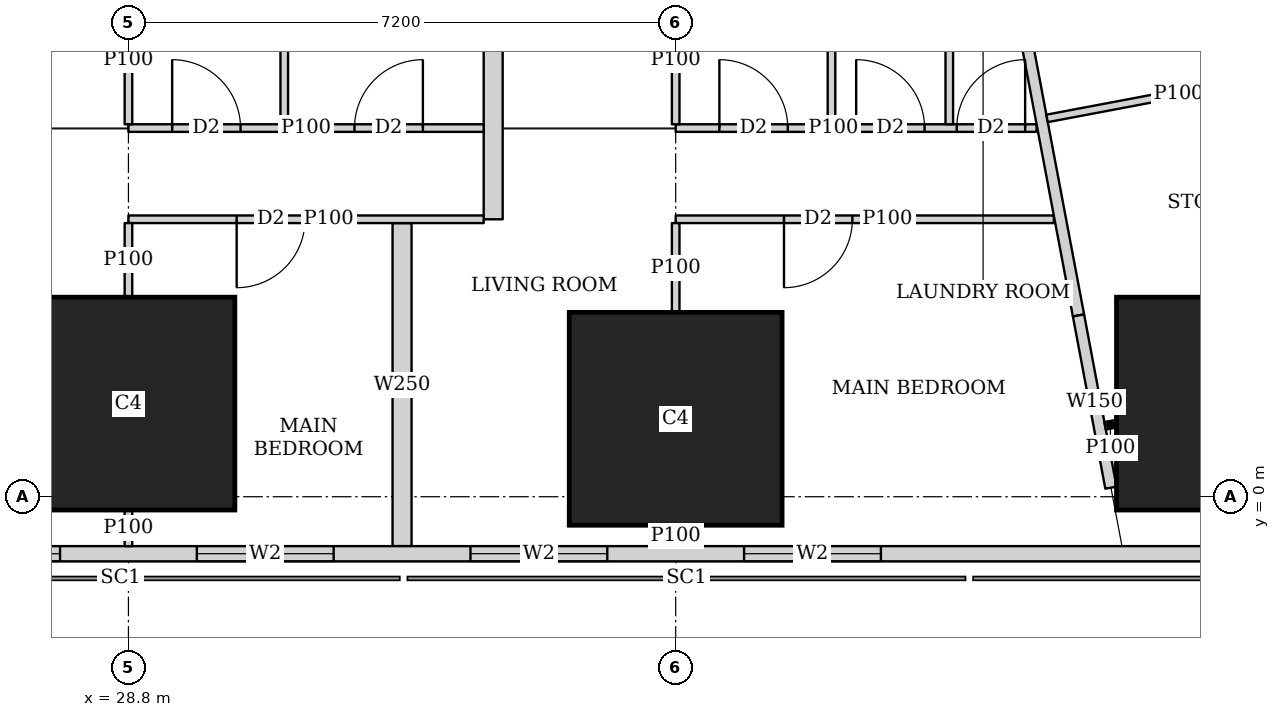
"""IFC4 building model, lengths in metres.
Left out: names, types, materials, properties, quantities, classifications, styles, units other than length and angle.
Written with IfcOpenShell. Run it as: python <this file> out.ifc"""

import sys

from ifc_helpers import new_model, si_unit, direction, frame, frame_2d, origin, origin_2d, place, context, subcontext, project, spatial, rectangle, extrude, element, fill, save


model = new_model("IFC4")
c1 = context("Model", 3, precision=1e-05, world=origin(), true_north=direction((0.0, 1.0)))
c2 = subcontext(c1, "Body", "Model", "MODEL_VIEW")
j1 = project(units=[si_unit("LENGTHUNIT", "METRE"), si_unit("PLANEANGLEUNIT", "RADIAN")], contexts=[c1])
p1 = place(None, origin())
s1 = spatial("IfcSite", under=j1, at=p1, CompositionType="ELEMENT")
p2 = place(p1, origin())
s2 = spatial("IfcBuilding", under=s1, at=p2, CompositionType="ELEMENT")
p3 = place(p2, frame((0.0, 0.0, 68.75)))
s3 = spatial("IfcBuildingStorey", under=s2, at=p3, CompositionType="ELEMENT", Elevation=68.75)
for number, where, z_axis, x_axis in (
    (1, (28.8, 1.225, 0.0), (0.0, 0.0, 1.0), (1.0, 0.0, 0.0)),
    (2, (36.0, 1.025, 0.0), (0.0, 0.0, 1.0), (1.0, 0.0, 0.0)),
    (3, (43.2, 1.225, 0.0), (0.0, 0.0, 1.0), (1.0, 0.0, 0.0)),
):
    element("IfcColumn", number, at=place(p3, frame(where, z_axis=z_axis, x_axis=x_axis)), inside=s3, PredefinedType="COLUMN", context=c2, shape_type="SweptSolid", body=[
        extrude(rectangle(XDim=2.8, YDim=2.8, at=origin_2d()), origin(), (0.0, 0.0, 1.0), 3.75),
    ])
p4 = place(p3, frame((2.163, -0.75, 0.0), z_axis=(0.0, 0.0, 1.0), x_axis=(1.0, 0.0, 0.0)))
e4 = element("IfcWall", 4, at=p4, inside=s3, PredefinedType="SOLIDWALL", context=c2, shape_type="SweptSolid", body=[
    extrude(rectangle(XDim=45.628, YDim=0.2, at=frame_2d((22.814, 0.0))), origin(), (0.0, 0.0, 1.0), 3.45),
])
p5 = place(p4, frame((9.537, 0.0, 0.9)))
e5 = element("IfcOpeningElement", 5, at=p5, cuts=e4, PredefinedType="OPENING", context=c2, shape_type="SweptSolid", body=[
    extrude(rectangle(XDim=1.8, YDim=1.5, at=frame_2d((0.9, 0.75))), frame((0.0, 0.11, 0.0), z_axis=(0.0, -1.0, 0.0), x_axis=(1.0, 0.0, 0.0)), (0.0, 0.0, 1.0), 0.22),
])
p6 = place(p4, frame((13.137, 0.0, 0.9)))
e6 = element("IfcOpeningElement", 6, at=p6, cuts=e4, PredefinedType="OPENING", context=c2, shape_type="SweptSolid", body=[
    extrude(rectangle(XDim=1.8, YDim=1.5, at=frame_2d((0.9, 0.75))), frame((0.0, 0.11, 0.0), z_axis=(0.0, -1.0, 0.0), x_axis=(1.0, 0.0, 0.0)), (0.0, 0.0, 1.0), 0.22),
])
p7 = place(p4, frame((16.737, 0.0, 0.9)))
e7 = element("IfcOpeningElement", 7, at=p7, cuts=e4, PredefinedType="OPENING", context=c2, shape_type="SweptSolid", body=[
    extrude(rectangle(XDim=1.8, YDim=1.5, at=frame_2d((0.9, 0.75))), frame((0.0, 0.11, 0.0), z_axis=(0.0, -1.0, 0.0), x_axis=(1.0, 0.0, 0.0)), (0.0, 0.0, 1.0), 0.22),
])
p8 = place(p4, frame((20.337, 0.0, 0.9)))
e8 = element("IfcOpeningElement", 8, at=p8, cuts=e4, PredefinedType="OPENING", context=c2, shape_type="SweptSolid", body=[
    extrude(rectangle(XDim=1.8, YDim=1.5, at=frame_2d((0.9, 0.75))), frame((0.0, 0.11, 0.0), z_axis=(0.0, -1.0, 0.0), x_axis=(1.0, 0.0, 0.0)), (0.0, 0.0, 1.0), 0.22),
])
p9 = place(p4, frame((23.937, 0.0, 0.9)))
e9 = element("IfcOpeningElement", 9, at=p9, cuts=e4, PredefinedType="OPENING", context=c2, shape_type="SweptSolid", body=[
    extrude(rectangle(XDim=1.8, YDim=1.5, at=frame_2d((0.9, 0.75))), frame((0.0, 0.11, 0.0), z_axis=(0.0, -1.0, 0.0), x_axis=(1.0, 0.0, 0.0)), (0.0, 0.0, 1.0), 0.22),
])
p10 = place(p4, frame((27.537, 0.0, 0.9)))
e10 = element("IfcOpeningElement", 10, at=p10, cuts=e4, PredefinedType="OPENING", context=c2, shape_type="SweptSolid", body=[
    extrude(rectangle(XDim=1.8, YDim=1.5, at=frame_2d((0.9, 0.75))), frame((0.0, 0.11, 0.0), z_axis=(0.0, -1.0, 0.0), x_axis=(1.0, 0.0, 0.0)), (0.0, 0.0, 1.0), 0.22),
])
p11 = place(p4, frame((31.137, 0.0, 0.9)))
e11 = element("IfcOpeningElement", 11, at=p11, cuts=e4, PredefinedType="OPENING", context=c2, shape_type="SweptSolid", body=[
    extrude(rectangle(XDim=1.8, YDim=1.5, at=frame_2d((0.9, 0.75))), frame((0.0, 0.11, 0.0), z_axis=(0.0, -1.0, 0.0), x_axis=(1.0, 0.0, 0.0)), (0.0, 0.0, 1.0), 0.22),
])
p12 = place(p4, frame((34.737, 0.0, 0.9)))
e12 = element("IfcOpeningElement", 12, at=p12, cuts=e4, PredefinedType="OPENING", context=c2, shape_type="SweptSolid", body=[
    extrude(rectangle(XDim=1.8, YDim=1.5, at=frame_2d((0.9, 0.75))), frame((0.0, 0.11, 0.0), z_axis=(0.0, -1.0, 0.0), x_axis=(1.0, 0.0, 0.0)), (0.0, 0.0, 1.0), 0.22),
])
p13 = place(p3, frame((50.653, 2.703, 0.0), z_axis=(0.0, 0.0, 1.0), x_axis=(-0.185612026696, 0.982623109613, 0.0)))
e13 = element("IfcWall", 13, at=p13, inside=s3, PredefinedType="SOLIDWALL", context=c2, shape_type="SweptSolid", body=[
    extrude(rectangle(XDim=41.393, YDim=0.2, at=frame_2d((20.697, 0.0))), origin(), (0.0, 0.0, 1.0), 3.45),
])
p14 = place(p13, frame((1.633, 0.0, 0.9)))
e14 = element("IfcOpeningElement", 14, at=p14, cuts=e13, PredefinedType="OPENING", context=c2, shape_type="SweptSolid", body=[
    extrude(rectangle(XDim=1.8, YDim=1.5, at=frame_2d((0.9, 0.75))), frame((0.0, 0.11, 0.0), z_axis=(0.0, -1.0, 0.0), x_axis=(1.0, 0.0, 0.0)), (0.0, 0.0, 1.0), 0.22),
])
p15 = place(p13, frame((6.032, 0.0, 0.9)))
e15 = element("IfcOpeningElement", 15, at=p15, cuts=e13, PredefinedType="OPENING", context=c2, shape_type="SweptSolid", body=[
    extrude(rectangle(XDim=1.8, YDim=1.5, at=frame_2d((0.9, 0.75))), frame((0.0, 0.11, 0.0), z_axis=(0.0, -1.0, 0.0), x_axis=(1.0, 0.0, 0.0)), (0.0, 0.0, 1.0), 0.22),
])
p16 = place(p13, frame((9.848, 0.0, 0.9)))
e16 = element("IfcOpeningElement", 16, at=p16, cuts=e13, PredefinedType="OPENING", context=c2, shape_type="SweptSolid", body=[
    extrude(rectangle(XDim=1.8, YDim=1.5, at=frame_2d((0.9, 0.75))), frame((0.0, 0.11, 0.0), z_axis=(0.0, -1.0, 0.0), x_axis=(1.0, 0.0, 0.0)), (0.0, 0.0, 1.0), 0.22),
])
p17 = place(p13, frame((17.481, 0.0, 0.9)))
e17 = element("IfcOpeningElement", 17, at=p17, cuts=e13, PredefinedType="OPENING", context=c2, shape_type="SweptSolid", body=[
    extrude(rectangle(XDim=1.8, YDim=1.5, at=frame_2d((0.9, 0.75))), frame((0.0, 0.11, 0.0), z_axis=(0.0, -1.0, 0.0), x_axis=(1.0, 0.0, 0.0)), (0.0, 0.0, 1.0), 0.22),
])
p18 = place(p13, frame((21.297, 0.0, 0.9)))
e18 = element("IfcOpeningElement", 18, at=p18, cuts=e13, PredefinedType="OPENING", context=c2, shape_type="SweptSolid", body=[
    extrude(rectangle(XDim=1.8, YDim=1.5, at=frame_2d((0.9, 0.75))), frame((0.0, 0.11, 0.0), z_axis=(0.0, -1.0, 0.0), x_axis=(1.0, 0.0, 0.0)), (0.0, 0.0, 1.0), 0.22),
])
p19 = place(p13, frame((25.113, 0.0, 0.9)))
e19 = element("IfcOpeningElement", 19, at=p19, cuts=e13, PredefinedType="OPENING", context=c2, shape_type="SweptSolid", body=[
    extrude(rectangle(XDim=1.8, YDim=1.5, at=frame_2d((0.9, 0.75))), frame((0.0, 0.11, 0.0), z_axis=(0.0, -1.0, 0.0), x_axis=(1.0, 0.0, 0.0)), (0.0, 0.0, 1.0), 0.22),
])
p20 = place(p13, frame((28.93, 0.0, 0.9)))
e20 = element("IfcOpeningElement", 20, at=p20, cuts=e13, PredefinedType="OPENING", context=c2, shape_type="SweptSolid", body=[
    extrude(rectangle(XDim=1.8, YDim=1.5, at=frame_2d((0.9, 0.75))), frame((0.0, 0.11, 0.0), z_axis=(0.0, -1.0, 0.0), x_axis=(1.0, 0.0, 0.0)), (0.0, 0.0, 1.0), 0.22),
])
p21 = place(p13, frame((32.746, 0.0, 0.9)))
e21 = element("IfcOpeningElement", 21, at=p21, cuts=e13, PredefinedType="OPENING", context=c2, shape_type="SweptSolid", body=[
    extrude(rectangle(XDim=1.8, YDim=1.5, at=frame_2d((0.9, 0.75))), frame((0.0, 0.11, 0.0), z_axis=(0.0, -1.0, 0.0), x_axis=(1.0, 0.0, 0.0)), (0.0, 0.0, 1.0), 0.22),
])
p22 = place(p13, frame((36.481, 0.0, 0.9)))
e22 = element("IfcOpeningElement", 22, at=p22, cuts=e13, PredefinedType="OPENING", context=c2, shape_type="SweptSolid", body=[
    extrude(rectangle(XDim=1.8, YDim=1.5, at=frame_2d((0.9, 0.75))), frame((0.0, 0.11, 0.0), z_axis=(0.0, -1.0, 0.0), x_axis=(1.0, 0.0, 0.0)), (0.0, 0.0, 1.0), 0.22),
])
p23 = place(p3, frame((33.68, 42.723, 0.0), z_axis=(0.0, 0.0, 1.0), x_axis=(0.185624129307, -0.98262082342, 0.0)))
e23 = element("IfcWall", 23, at=p23, inside=s3, PredefinedType="SOLIDWALL", context=c2, shape_type="SweptSolid", body=[
    extrude(rectangle(XDim=41.051, YDim=0.15, at=frame_2d((20.526, 0.0))), origin(), (0.0, 0.0, 1.0), 2.45),
])
p24 = place(p23, frame((13.577, 0.0, 0.0)))
e24 = element("IfcOpeningElement", 24, at=p24, cuts=e23, PredefinedType="OPENING", context=c2, shape_type="SweptSolid", body=[
    extrude(rectangle(XDim=1.0, YDim=2.1, at=frame_2d((0.5, 1.05))), frame((0.0, 0.085, 0.0), z_axis=(0.0, -1.0, 0.0), x_axis=(1.0, 0.0, 0.0)), (0.0, 0.0, 1.0), 0.17),
])
p25 = place(p23, frame((17.394, 0.0, 0.0)))
e25 = element("IfcOpeningElement", 25, at=p25, cuts=e23, PredefinedType="OPENING", context=c2, shape_type="SweptSolid", body=[
    extrude(rectangle(XDim=1.0, YDim=2.1, at=frame_2d((0.5, 1.05))), frame((0.0, 0.085, 0.0), z_axis=(0.0, -1.0, 0.0), x_axis=(1.0, 0.0, 0.0)), (0.0, 0.0, 1.0), 0.17),
])
p26 = place(p23, frame((26.758, 0.0, 0.0)))
e26 = element("IfcOpeningElement", 26, at=p26, cuts=e23, PredefinedType="OPENING", context=c2, shape_type="SweptSolid", body=[
    extrude(rectangle(XDim=1.0, YDim=2.1, at=frame_2d((0.5, 1.05))), frame((0.0, 0.085, 0.0), z_axis=(0.0, -1.0, 0.0), x_axis=(1.0, 0.0, 0.0)), (0.0, 0.0, 1.0), 0.17),
])
p27 = place(p23, frame((32.193, 0.0, 0.0)))
e27 = element("IfcOpeningElement", 27, at=p27, cuts=e23, PredefinedType="OPENING", context=c2, shape_type="SweptSolid", body=[
    extrude(rectangle(XDim=1.0, YDim=2.1, at=frame_2d((0.5, 1.05))), frame((0.0, 0.085, 0.0), z_axis=(0.0, -1.0, 0.0), x_axis=(1.0, 0.0, 0.0)), (0.0, 0.0, 1.0), 0.17),
])
p28 = place(p3, frame((41.3, 2.385, 0.0), z_axis=(0.0, 0.0, 1.0), x_axis=(0.185170596553, -0.982706390624, 0.0)))
e28 = element("IfcWall", 28, at=p28, inside=s3, PredefinedType="SOLIDWALL", context=c2, shape_type="SweptSolid", body=[
    extrude(rectangle(XDim=2.306, YDim=0.15, at=frame_2d((1.153, 0.0))), origin(), (0.0, 0.0, 1.0), 2.0),
])
p29 = place(p3, frame((33.474, 3.65, 0.0), z_axis=(0.0, 0.0, 1.0), x_axis=(-1.0, 0.0, 0.0)))
e29 = element("IfcWall", 29, at=p29, inside=s3, PredefinedType="PARTITIONING", context=c2, shape_type="SweptSolid", body=[
    extrude(rectangle(XDim=4.674, YDim=0.1, at=frame_2d((2.337, 0.0))), origin(), (0.0, 0.0, 1.0), 3.45),
])
p30 = place(p29, frame((2.35, 0.0, 0.0)))
e30 = element("IfcOpeningElement", 30, at=p30, cuts=e29, PredefinedType="OPENING", context=c2, shape_type="SweptSolid", body=[
    extrude(rectangle(XDim=0.9, YDim=2.1, at=frame_2d((0.45, 1.05))), frame((0.0, 0.06, 0.0), z_axis=(0.0, -1.0, 0.0), x_axis=(1.0, 0.0, 0.0)), (0.0, 0.0, 1.0), 0.12),
])
p31 = place(p3, frame((33.474, 4.85, 0.0), z_axis=(0.0, 0.0, 1.0), x_axis=(-1.0, 0.0, 0.0)))
e31 = element("IfcWall", 31, at=p31, inside=s3, PredefinedType="PARTITIONING", context=c2, shape_type="SweptSolid", body=[
    extrude(rectangle(XDim=4.674, YDim=0.1, at=frame_2d((2.337, 0.0))), origin(), (0.0, 0.0, 1.0), 3.45),
])
p32 = place(p31, frame((3.199, 0.0, 0.0)))
e32 = element("IfcOpeningElement", 32, at=p32, cuts=e31, PredefinedType="OPENING", context=c2, shape_type="SweptSolid", body=[
    extrude(rectangle(XDim=0.9, YDim=2.1, at=frame_2d((0.45, 1.05))), frame((0.0, 0.06, 0.0), z_axis=(0.0, -1.0, 0.0), x_axis=(1.0, 0.0, 0.0)), (0.0, 0.0, 1.0), 0.12),
])
p33 = place(p31, frame((0.8, 0.0, 0.0)))
e33 = element("IfcOpeningElement", 33, at=p33, cuts=e31, PredefinedType="OPENING", context=c2, shape_type="SweptSolid", body=[
    extrude(rectangle(XDim=0.9, YDim=2.1, at=frame_2d((0.45, 1.05))), frame((0.0, 0.06, 0.0), z_axis=(0.0, -1.0, 0.0), x_axis=(1.0, 0.0, 0.0)), (0.0, 0.0, 1.0), 0.12),
])
p34 = place(p3, frame((28.8, -0.65, 0.0), z_axis=(0.0, 0.0, 1.0), x_axis=(0.0, 1.0, 0.0)))
e34 = element("IfcWall", 34, at=p34, inside=s3, PredefinedType="PARTITIONING", context=c2, shape_type="SweptSolid", body=[
    extrude(rectangle(XDim=0.474, YDim=0.1, at=frame_2d((0.237, 0.0))), origin(), (0.0, 0.0, 1.0), 3.45),
])
p35 = place(p3, frame((28.8, 2.626, 0.0), z_axis=(0.0, 0.0, 1.0), x_axis=(0.0, 1.0, 0.0)))
e35 = element("IfcWall", 35, at=p35, inside=s3, PredefinedType="PARTITIONING", context=c2, shape_type="SweptSolid", body=[
    extrude(rectangle(XDim=0.974, YDim=0.1, at=frame_2d((0.487, 0.0))), origin(), (0.0, 0.0, 1.0), 3.45),
])
p36 = place(p3, frame((28.8, 4.9, 0.0), z_axis=(0.0, 0.0, 1.0), x_axis=(0.0, 1.0, 0.0)))
e36 = element("IfcWall", 36, at=p36, inside=s3, PredefinedType="PARTITIONING", context=c2, shape_type="SweptSolid", body=[
    extrude(rectangle(XDim=1.699, YDim=0.1, at=frame_2d((0.85, 0.0))), origin(), (0.0, 0.0, 1.0), 3.45),
])
p37 = place(p3, frame((30.85, 4.9, 0.0), z_axis=(0.0, 0.0, 1.0), x_axis=(0.0, 1.0, 0.0)))
e37 = element("IfcWall", 37, at=p37, inside=s3, PredefinedType="PARTITIONING", context=c2, shape_type="SweptSolid", body=[
    extrude(rectangle(XDim=3.525, YDim=0.1, at=frame_2d((1.763, 0.0))), origin(), (0.0, 0.0, 1.0), 3.45),
])
p38 = place(p3, frame((40.975, 3.65, 0.0), z_axis=(0.0, 0.0, 1.0), x_axis=(-1.0, 0.0, 0.0)))
e38 = element("IfcWall", 38, at=p38, inside=s3, PredefinedType="PARTITIONING", context=c2, shape_type="SweptSolid", body=[
    extrude(rectangle(XDim=4.975, YDim=0.1, at=frame_2d((2.488, 0.0))), origin(), (0.0, 0.0, 1.0), 3.45),
])
p39 = place(p38, frame((2.65, 0.0, 0.0)))
e39 = element("IfcOpeningElement", 39, at=p39, cuts=e38, PredefinedType="OPENING", context=c2, shape_type="SweptSolid", body=[
    extrude(rectangle(XDim=0.9, YDim=2.1, at=frame_2d((0.45, 1.05))), frame((0.0, 0.06, 0.0), z_axis=(0.0, -1.0, 0.0), x_axis=(1.0, 0.0, 0.0)), (0.0, 0.0, 1.0), 0.12),
])
p40 = place(p3, frame((40.748, 4.85, 0.0), z_axis=(0.0, 0.0, 1.0), x_axis=(-1.0, 0.0, 0.0)))
e40 = element("IfcWall", 40, at=p40, inside=s3, PredefinedType="PARTITIONING", context=c2, shape_type="SweptSolid", body=[
    extrude(rectangle(XDim=4.748, YDim=0.1, at=frame_2d((2.374, 0.0))), origin(), (0.0, 0.0, 1.0), 3.45),
])
p41 = place(p40, frame((3.273, 0.0, 0.0)))
e41 = element("IfcOpeningElement", 41, at=p41, cuts=e40, PredefinedType="OPENING", context=c2, shape_type="SweptSolid", body=[
    extrude(rectangle(XDim=0.9, YDim=2.1, at=frame_2d((0.45, 1.05))), frame((0.0, 0.06, 0.0), z_axis=(0.0, -1.0, 0.0), x_axis=(1.0, 0.0, 0.0)), (0.0, 0.0, 1.0), 0.12),
])
p42 = place(p40, frame((0.15, 0.0, 0.0)))
e42 = element("IfcOpeningElement", 42, at=p42, cuts=e40, PredefinedType="OPENING", context=c2, shape_type="SweptSolid", body=[
    extrude(rectangle(XDim=0.9, YDim=2.1, at=frame_2d((0.45, 1.05))), frame((0.0, 0.06, 0.0), z_axis=(0.0, -1.0, 0.0), x_axis=(1.0, 0.0, 0.0)), (0.0, 0.0, 1.0), 0.12),
])
p43 = place(p40, frame((1.473, 0.0, 0.0)))
e43 = element("IfcOpeningElement", 43, at=p43, cuts=e40, PredefinedType="OPENING", context=c2, shape_type="SweptSolid", body=[
    extrude(rectangle(XDim=0.9, YDim=2.1, at=frame_2d((0.45, 1.05))), frame((0.0, 0.06, 0.0), z_axis=(0.0, -1.0, 0.0), x_axis=(1.0, 0.0, 0.0)), (0.0, 0.0, 1.0), 0.12),
])
p44 = place(p3, frame((36.0, -0.65, 0.0), z_axis=(0.0, 0.0, 1.0), x_axis=(0.0, 1.0, 0.0)))
e44 = element("IfcWall", 44, at=p44, inside=s3, PredefinedType="PARTITIONING", context=c2, shape_type="SweptSolid", body=[
    extrude(rectangle(XDim=0.274, YDim=0.1, at=frame_2d((0.137, 0.0))), origin(), (0.0, 0.0, 1.0), 3.45),
])
p45 = place(p3, frame((36.0, 2.426, 0.0), z_axis=(0.0, 0.0, 1.0), x_axis=(0.0, 1.0, 0.0)))
e45 = element("IfcWall", 45, at=p45, inside=s3, PredefinedType="PARTITIONING", context=c2, shape_type="SweptSolid", body=[
    extrude(rectangle(XDim=1.174, YDim=0.1, at=frame_2d((0.587, 0.0))), origin(), (0.0, 0.0, 1.0), 3.45),
])
p46 = place(p3, frame((36.0, 4.9, 0.0), z_axis=(0.0, 0.0, 1.0), x_axis=(0.0, 1.0, 0.0)))
e46 = element("IfcWall", 46, at=p46, inside=s3, PredefinedType="PARTITIONING", context=c2, shape_type="SweptSolid", body=[
    extrude(rectangle(XDim=1.699, YDim=0.1, at=frame_2d((0.85, 0.0))), origin(), (0.0, 0.0, 1.0), 3.45),
])
for number, where, z_axis, x_axis in (
    (47, (39.6, 4.9, 0.0), (0.0, 0.0, 1.0), (0.0, 1.0, 0.0)),
    (48, (38.05, 4.9, 0.0), (0.0, 0.0, 1.0), (0.0, 1.0, 0.0)),
):
    element("IfcWall", number, at=place(p3, frame(where, z_axis=z_axis, x_axis=x_axis)), inside=s3, PredefinedType="PARTITIONING", context=c2, shape_type="SweptSolid", body=[
        extrude(rectangle(XDim=3.525, YDim=0.1, at=frame_2d((1.763, 0.0))), origin(), (0.0, 0.0, 1.0), 3.45),
    ])
p47 = place(p3, frame((32.4, -0.65, 0.0), z_axis=(0.0, 0.0, 1.0), x_axis=(0.0, 1.0, 0.0)))
e49 = element("IfcWall", 49, at=p47, inside=s3, PredefinedType="SOLIDWALL", context=c2, shape_type="SweptSolid", body=[
    extrude(rectangle(XDim=4.25, YDim=0.25, at=frame_2d((2.125, 0.0))), origin(), (0.0, 0.0, 1.0), 2.0),
])
p48 = place(p3, frame((33.599, 3.65, 0.0), z_axis=(0.0, 0.0, 1.0), x_axis=(0.0, 1.0, 0.0)))
e50 = element("IfcWall", 50, at=p48, inside=s3, PredefinedType="SOLIDWALL", context=c2, shape_type="SweptSolid", body=[
    extrude(rectangle(XDim=4.775, YDim=0.25, at=frame_2d((2.388, 0.0))), origin(), (0.0, 0.0, 1.0), 3.45),
])
p49 = place(p3, frame((41.79, 0.959, 0.0), z_axis=(0.0, 0.0, 1.0), x_axis=(-0.983372768072, -0.181598455428, 0.0)))
e51 = element("IfcWall", 51, at=p49, inside=s3, PredefinedType="PARTITIONING", context=c2, shape_type="SweptSolid", body=[
    extrude(rectangle(XDim=0.143, YDim=0.1, at=frame_2d((0.071, 0.0))), origin(), (0.0, 0.0, 1.0), 2.0),
])
p50 = place(p3, frame((44.349, 5.631, 0.0), z_axis=(0.0, 0.0, 1.0), x_axis=(-0.982629014545, -0.18558076348, 0.0)))
e52 = element("IfcWall", 52, at=p50, inside=s3, PredefinedType="PARTITIONING", context=c2, shape_type="SweptSolid", body=[
    extrude(rectangle(XDim=3.524, YDim=0.1, at=frame_2d((1.762, 0.0))), origin(), (0.0, 0.0, 1.0), 3.45),
])
p51 = place(p9, origin())
e53 = element("IfcWindow", 53, at=p51, inside=s3, PartitioningType="SINGLE_PANEL", PredefinedType="WINDOW", context=c2, shape_type="SweptSolid", body=[
    extrude(rectangle(XDim=1.8, YDim=1.5, at=frame_2d((0.9, 0.75))), frame((0.0, 0.03, 0.0), z_axis=(0.0, -1.0, 0.0), x_axis=(1.0, 0.0, 0.0)), (0.0, 0.0, 1.0), 0.06),
])
fill(e9, e53)
p52 = place(p10, origin())
e54 = element("IfcWindow", 54, at=p52, inside=s3, PartitioningType="SINGLE_PANEL", PredefinedType="WINDOW", context=c2, shape_type="SweptSolid", body=[
    extrude(rectangle(XDim=1.8, YDim=1.5, at=frame_2d((0.9, 0.75))), frame((0.0, 0.03, 0.0), z_axis=(0.0, -1.0, 0.0), x_axis=(1.0, 0.0, 0.0)), (0.0, 0.0, 1.0), 0.06),
])
fill(e10, e54)
p53 = place(p11, origin())
e55 = element("IfcWindow", 55, at=p53, inside=s3, PartitioningType="SINGLE_PANEL", PredefinedType="WINDOW", context=c2, shape_type="SweptSolid", body=[
    extrude(rectangle(XDim=1.8, YDim=1.5, at=frame_2d((0.9, 0.75))), frame((0.0, 0.03, 0.0), z_axis=(0.0, -1.0, 0.0), x_axis=(1.0, 0.0, 0.0)), (0.0, 0.0, 1.0), 0.06),
])
fill(e11, e55)
p54 = place(p12, origin())
e56 = element("IfcWindow", 56, at=p54, inside=s3, PartitioningType="SINGLE_PANEL", PredefinedType="WINDOW", context=c2, shape_type="SweptSolid", body=[
    extrude(rectangle(XDim=1.8, YDim=1.5, at=frame_2d((0.9, 0.75))), frame((0.0, 0.03, 0.0), z_axis=(0.0, -1.0, 0.0), x_axis=(1.0, 0.0, 0.0)), (0.0, 0.0, 1.0), 0.06),
])
fill(e12, e56)
p55 = place(p30, origin())
e57 = element("IfcDoor", 57, at=p55, inside=s3, OperationType="SINGLE_SWING_RIGHT", PredefinedType="DOOR", context=c2, shape_type="SweptSolid", body=[
    extrude(rectangle(XDim=0.9, YDim=2.1, at=frame_2d((0.45, 1.05))), frame((0.0, 0.025, 0.0), z_axis=(0.0, -1.0, 0.0), x_axis=(1.0, 0.0, 0.0)), (0.0, 0.0, 1.0), 0.05),
])
fill(e30, e57)
p56 = place(p32, origin())
e58 = element("IfcDoor", 58, at=p56, inside=s3, OperationType="SINGLE_SWING_LEFT", PredefinedType="DOOR", context=c2, shape_type="SweptSolid", body=[
    extrude(rectangle(XDim=0.9, YDim=2.1, at=frame_2d((0.45, 1.05))), frame((0.0, 0.025, 0.0), z_axis=(0.0, -1.0, 0.0), x_axis=(1.0, 0.0, 0.0)), (0.0, 0.0, 1.0), 0.05),
])
fill(e32, e58)
p57 = place(p33, origin())
e59 = element("IfcDoor", 59, at=p57, inside=s3, OperationType="SINGLE_SWING_RIGHT", PredefinedType="DOOR", context=c2, shape_type="SweptSolid", body=[
    extrude(rectangle(XDim=0.9, YDim=2.1, at=frame_2d((0.45, 1.05))), frame((0.0, 0.025, 0.0), z_axis=(0.0, -1.0, 0.0), x_axis=(1.0, 0.0, 0.0)), (0.0, 0.0, 1.0), 0.05),
])
fill(e33, e59)
p58 = place(p39, origin())
e60 = element("IfcDoor", 60, at=p58, inside=s3, OperationType="SINGLE_SWING_RIGHT", PredefinedType="DOOR", context=c2, shape_type="SweptSolid", body=[
    extrude(rectangle(XDim=0.9, YDim=2.1, at=frame_2d((0.45, 1.05))), frame((0.0, 0.025, 0.0), z_axis=(0.0, -1.0, 0.0), x_axis=(1.0, 0.0, 0.0)), (0.0, 0.0, 1.0), 0.05),
])
fill(e39, e60)
p59 = place(p41, origin())
e61 = element("IfcDoor", 61, at=p59, inside=s3, OperationType="SINGLE_SWING_LEFT", PredefinedType="DOOR", context=c2, shape_type="SweptSolid", body=[
    extrude(rectangle(XDim=0.9, YDim=2.1, at=frame_2d((0.45, 1.05))), frame((0.0, 0.025, 0.0), z_axis=(0.0, -1.0, 0.0), x_axis=(1.0, 0.0, 0.0)), (0.0, 0.0, 1.0), 0.05),
])
fill(e41, e61)
p60 = place(p42, origin())
e62 = element("IfcDoor", 62, at=p60, inside=s3, OperationType="SINGLE_SWING_RIGHT", PredefinedType="DOOR", context=c2, shape_type="SweptSolid", body=[
    extrude(rectangle(XDim=0.9, YDim=2.1, at=frame_2d((0.45, 1.05))), frame((0.0, 0.025, 0.0), z_axis=(0.0, -1.0, 0.0), x_axis=(1.0, 0.0, 0.0)), (0.0, 0.0, 1.0), 0.05),
])
fill(e42, e62)
p61 = place(p43, origin())
e63 = element("IfcDoor", 63, at=p61, inside=s3, OperationType="SINGLE_SWING_LEFT", PredefinedType="DOOR", context=c2, shape_type="SweptSolid", body=[
    extrude(rectangle(XDim=0.9, YDim=2.1, at=frame_2d((0.45, 1.05))), frame((0.0, 0.025, 0.0), z_axis=(0.0, -1.0, 0.0), x_axis=(1.0, 0.0, 0.0)), (0.0, 0.0, 1.0), 0.05),
])
fill(e43, e63)
save(model, sys.argv[1])
